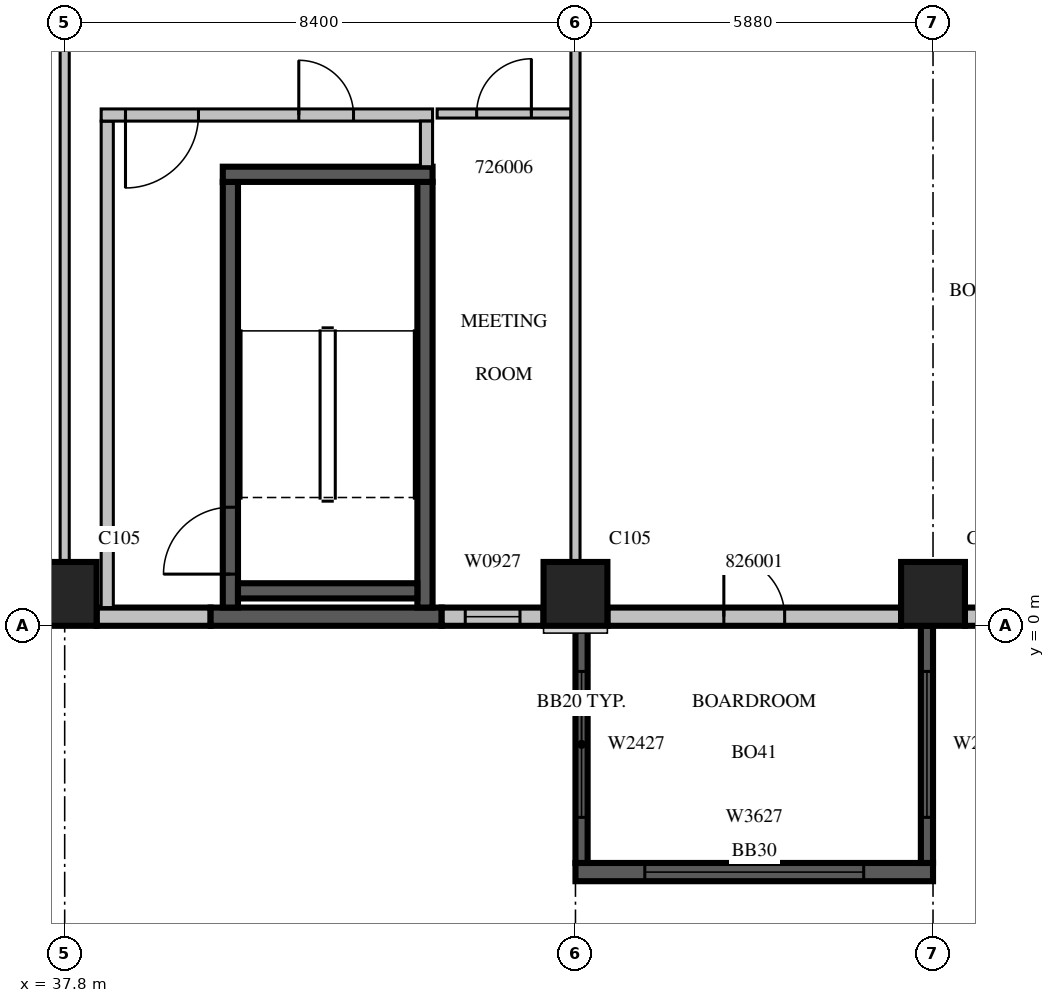
"""IFC4 building model, lengths in metres.
Left out: names, types, materials, properties, quantities, classifications, styles, units other than length and angle.
Written with IfcOpenShell. Run it as: python <this file> out.ifc"""

import sys

from ifc_helpers import new_model, si_unit, direction, frame, frame_2d, origin, origin_2d, place, context, subcontext, project, spatial, rectangle, extrude, source, transform, mapped, element, fill, save


model = new_model("IFC4")
c1 = context("Model", 3, precision=1e-05, world=origin(), true_north=direction((0.0, 1.0)))
c2 = subcontext(c1, "Body", "Model", "MODEL_VIEW")
j1 = project(units=[si_unit("LENGTHUNIT", "METRE"), si_unit("PLANEANGLEUNIT", "RADIAN")], contexts=[c1])
p1 = place(None, origin())
s1 = spatial("IfcSite", under=j1, at=p1, CompositionType="ELEMENT")
p2 = place(p1, origin())
s2 = spatial("IfcBuilding", under=s1, at=p2, CompositionType="ELEMENT")
p3 = place(p2, frame((0.0, 0.0, 120.3)))
s3 = spatial("IfcBuildingStorey", under=s2, at=p3, CompositionType="ELEMENT", Elevation=120.3)
m1 = source(origin(), c2, "Body", "SweptSolid", [
    extrude(rectangle(XDim=1.05, YDim=1.05, at=origin_2d()), origin(), (0.0, 0.0, 1.0), 4.2),
])
for number, where, z_axis, x_axis in (
    (1, (37.8, 0.525, 0.0), (0.0, 0.0, 1.0), (1.0, 0.0, 0.0)),
    (2, (46.2, 0.525, 0.0), (0.0, 0.0, 1.0), (1.0, 0.0, 0.0)),
    (3, (52.08, 0.525, 0.0), (0.0, 0.0, 1.0), (1.0, 0.0, 0.0)),
):
    element("IfcColumn", number, at=place(p3, frame(where, z_axis=z_axis, x_axis=x_axis)), inside=s3, PredefinedType="COLUMN", context=c2, shape_type="MappedRepresentation", body=[
        mapped(m1, transform((0.0, 0.0, 0.0), scale=1.0)),
    ])
m2 = source(origin(), c2, "Body", "SweptSolid", [
    extrude(rectangle(XDim=1.875, YDim=0.3, at=frame_2d((0.938, 0.0))), origin(), (0.0, 0.0, 1.0), 3.8),
])
p4 = place(p3, frame((38.325, 0.15, 0.0), z_axis=(0.0, 0.0, 1.0), x_axis=(1.0, 0.0, 0.0)))
e4 = element("IfcWall", 4, at=p4, inside=s3, PredefinedType="STANDARD", context=c2, shape_type="MappedRepresentation", body=[
    mapped(m2, transform((0.0, 0.0, 0.0), scale=1.0)),
])
m3 = source(origin(), c2, "Body", "SweptSolid", [
    extrude(rectangle(XDim=3.8, YDim=0.3, at=frame_2d((1.9, 0.0))), origin(), (0.0, 0.0, 1.0), 3.8),
])
p5 = place(p3, frame((40.2, 0.15, 0.0), z_axis=(0.0, 0.0, 1.0), x_axis=(1.0, 0.0, 0.0)))
e5 = element("IfcWall", 5, at=p5, inside=s3, PredefinedType="SOLIDWALL", context=c2, shape_type="MappedRepresentation", body=[
    mapped(m3, transform((0.0, 0.0, 0.0), scale=1.0)),
])
m4 = source(origin(), c2, "Body", "SweptSolid", [
    extrude(rectangle(XDim=1.675, YDim=0.3, at=frame_2d((0.838, 0.0))), origin(), (0.0, 0.0, 1.0), 3.8),
])
p6 = place(p3, frame((44.0, 0.15, 0.0), z_axis=(0.0, 0.0, 1.0), x_axis=(1.0, 0.0, 0.0)))
e6 = element("IfcWall", 6, at=p6, inside=s3, PredefinedType="STANDARD", context=c2, shape_type="MappedRepresentation", body=[
    mapped(m4, transform((0.0, 0.0, 0.0), scale=1.0)),
])
m5 = source(origin(), c2, "Body", "SweptSolid", [
    extrude(rectangle(XDim=0.9, YDim=2.7, at=frame_2d((0.45, 1.35))), frame((0.0, 0.16, 0.0), z_axis=(0.0, -1.0, 0.0), x_axis=(1.0, 0.0, 0.0)), (0.0, 0.0, 1.0), 0.32),
])
p7 = place(p6, frame((0.388, 0.0, 0.6)))
e7 = element("IfcOpeningElement", 7, at=p7, cuts=e6, PredefinedType="OPENING", context=c2, shape_type="MappedRepresentation", body=[
    mapped(m5, transform((0.0, 0.0, 0.0), scale=1.0)),
])
m6 = source(origin(), c2, "Body", "SweptSolid", [
    extrude(rectangle(XDim=4.83, YDim=0.3, at=frame_2d((2.415, 0.0))), origin(), (0.0, 0.0, 1.0), 3.8),
])
p8 = place(p3, frame((46.725, 0.15, 0.0), z_axis=(0.0, 0.0, 1.0), x_axis=(1.0, 0.0, 0.0)))
e8 = element("IfcWall", 8, at=p8, inside=s3, PredefinedType="STANDARD", context=c2, shape_type="MappedRepresentation", body=[
    mapped(m6, transform((0.0, 0.0, 0.0), scale=1.0)),
])
m7 = source(origin(), c2, "Body", "SweptSolid", [
    extrude(rectangle(XDim=1.0, YDim=2.1, at=frame_2d((0.5, 1.05))), frame((0.0, 0.16, 0.0), z_axis=(0.0, -1.0, 0.0), x_axis=(1.0, 0.0, 0.0)), (0.0, 0.0, 1.0), 0.32),
])
p9 = place(p8, frame((1.915, 0.0, 0.0)))
e9 = element("IfcOpeningElement", 9, at=p9, cuts=e8, PredefinedType="OPENING", context=c2, shape_type="MappedRepresentation", body=[
    mapped(m7, transform((0.0, 0.0, 0.0), scale=1.0)),
])
p10 = place(p3, frame((52.605, 0.15, 0.0), z_axis=(0.0, 0.0, 1.0), x_axis=(1.0, 0.0, 0.0)))
e10 = element("IfcWall", 10, at=p10, inside=s3, PredefinedType="STANDARD", context=c2, shape_type="MappedRepresentation", body=[
    mapped(m6, transform((0.0, 0.0, 0.0), scale=1.0)),
])
m8 = source(origin(), c2, "Body", "SweptSolid", [
    extrude(rectangle(XDim=3.6, YDim=2.7, at=frame_2d((1.8, 1.35))), frame((0.0, 0.16, 0.0), z_axis=(0.0, -1.0, 0.0), x_axis=(1.0, 0.0, 0.0)), (0.0, 0.0, 1.0), 0.32),
])
p11 = place(p10, frame((0.615, 0.0, 0.6)))
e11 = element("IfcOpeningElement", 11, at=p11, cuts=e10, PredefinedType="OPENING", context=c2, shape_type="MappedRepresentation", body=[
    mapped(m8, transform((0.0, 0.0, 0.0), scale=1.0)),
])
m9 = source(origin(), c2, "Body", "SweptSolid", [
    extrude(rectangle(XDim=5.88, YDim=0.3, at=frame_2d((2.94, 0.0))), origin(), (0.0, 0.0, 1.0), 3.79),
])
p12 = place(p3, frame((46.2, -4.05, 0.0), z_axis=(0.0, 0.0, 1.0), x_axis=(1.0, 0.0, 0.0)))
e12 = element("IfcWall", 12, at=p12, inside=s3, PredefinedType="SOLIDWALL", context=c2, shape_type="MappedRepresentation", body=[
    mapped(m9, transform((0.0, 0.0, 0.0), scale=1.0)),
])
p13 = place(p12, frame((1.14, 0.0, 0.6)))
e13 = element("IfcOpeningElement", 13, at=p13, cuts=e12, PredefinedType="OPENING", context=c2, shape_type="MappedRepresentation", body=[
    mapped(m8, transform((0.0, 0.0, 0.0), scale=1.0)),
])
m10 = source(origin(), c2, "Body", "SweptSolid", [
    extrude(rectangle(XDim=3.9, YDim=0.2, at=frame_2d((1.95, 0.0))), origin(), (0.0, 0.0, 1.0), 3.79),
])
p14 = place(p3, frame((46.3, 0.0, 0.0), z_axis=(0.0, 0.0, 1.0), x_axis=(0.0, -1.0, 0.0)))
e14 = element("IfcWall", 14, at=p14, inside=s3, PredefinedType="SOLIDWALL", context=c2, shape_type="MappedRepresentation", body=[
    mapped(m10, transform((0.0, 0.0, 0.0), scale=1.0)),
])
m11 = source(origin(), c2, "Body", "SweptSolid", [
    extrude(rectangle(XDim=2.4, YDim=2.7, at=frame_2d((1.2, 1.35))), frame((0.0, 0.11, 0.0), z_axis=(0.0, -1.0, 0.0), x_axis=(1.0, 0.0, 0.0)), (0.0, 0.0, 1.0), 0.22),
])
p15 = place(p14, frame((0.75, 0.0, 0.6)))
e15 = element("IfcOpeningElement", 15, at=p15, cuts=e14, PredefinedType="OPENING", context=c2, shape_type="MappedRepresentation", body=[
    mapped(m11, transform((0.0, 0.0, 0.0), scale=1.0)),
])
p16 = place(p3, frame((51.98, 0.0, 0.0), z_axis=(0.0, 0.0, 1.0), x_axis=(0.0, -1.0, 0.0)))
e16 = element("IfcWall", 16, at=p16, inside=s3, PredefinedType="SOLIDWALL", context=c2, shape_type="MappedRepresentation", body=[
    mapped(m10, transform((0.0, 0.0, 0.0), scale=1.0)),
])
p17 = place(p16, frame((0.75, 0.0, 0.6)))
e17 = element("IfcOpeningElement", 17, at=p17, cuts=e16, PredefinedType="OPENING", context=c2, shape_type="MappedRepresentation", body=[
    mapped(m11, transform((0.0, 0.0, 0.0), scale=1.0)),
])
m12 = source(origin(), c2, "Body", "SweptSolid", [
    extrude(rectangle(XDim=7.0, YDim=0.25, at=frame_2d((3.5, 0.0))), origin(), (0.0, 0.0, 1.0), 3.8),
])
p18 = place(p3, frame((40.525, 0.3, 0.0), z_axis=(0.0, 0.0, 1.0), x_axis=(0.0, 1.0, 0.0)))
e18 = element("IfcWall", 18, at=p18, inside=s3, PredefinedType="SOLIDWALL", context=c2, shape_type="MappedRepresentation", body=[
    mapped(m12, transform((0.0, 0.0, 0.0), scale=1.0)),
])
m13 = source(origin(), c2, "Body", "SweptSolid", [
    extrude(rectangle(XDim=1.1, YDim=2.1, at=frame_2d((0.55, 1.05))), frame((0.0, 0.135, 0.0), z_axis=(0.0, -1.0, 0.0), x_axis=(1.0, 0.0, 0.0)), (0.0, 0.0, 1.0), 0.27),
])
p19 = place(p18, frame((0.55, 0.0, 0.0)))
e19 = element("IfcOpeningElement", 19, at=p19, cuts=e18, PredefinedType="OPENING", context=c2, shape_type="MappedRepresentation", body=[
    mapped(m13, transform((0.0, 0.0, 0.0), scale=1.0)),
])
p20 = place(p3, frame((43.725, 0.3, 0.0), z_axis=(0.0, 0.0, 1.0), x_axis=(0.0, 1.0, 0.0)))
e20 = element("IfcWall", 20, at=p20, inside=s3, PredefinedType="SOLIDWALL", context=c2, shape_type="MappedRepresentation", body=[
    mapped(m12, transform((0.0, 0.0, 0.0), scale=1.0)),
])
m14 = source(origin(), c2, "Body", "SweptSolid", [
    extrude(rectangle(XDim=3.45, YDim=0.25, at=frame_2d((1.725, 0.0))), origin(), (0.0, 0.0, 1.0), 3.8),
])
p21 = place(p3, frame((40.4, 7.425, 0.0), z_axis=(0.0, 0.0, 1.0), x_axis=(1.0, 0.0, 0.0)))
e21 = element("IfcWall", 21, at=p21, inside=s3, PredefinedType="SOLIDWALL", context=c2, shape_type="MappedRepresentation", body=[
    mapped(m14, transform((0.0, 0.0, 0.0), scale=1.0)),
])
m15 = source(origin(), c2, "Body", "SweptSolid", [
    extrude(rectangle(XDim=2.95, YDim=0.25, at=frame_2d((1.475, 0.0))), origin(), (0.0, 0.0, 1.0), 3.8),
])
p22 = place(p3, frame((40.65, 0.575, 0.0), z_axis=(0.0, 0.0, 1.0), x_axis=(1.0, 0.0, 0.0)))
e22 = element("IfcWall", 22, at=p22, inside=s3, PredefinedType="SOLIDWALL", context=c2, shape_type="MappedRepresentation", body=[
    mapped(m15, transform((0.0, 0.0, 0.0), scale=1.0)),
])
m16 = source(origin(), c2, "Body", "SweptSolid", [
    extrude(rectangle(XDim=8.0, YDim=0.2, at=frame_2d((4.0, 0.0))), origin(), (0.0, 0.0, 1.0), 3.8),
])
p23 = place(p3, frame((38.5, 0.3, 0.0), z_axis=(0.0, 0.0, 1.0), x_axis=(0.0, 1.0, 0.0)))
e23 = element("IfcWall", 23, at=p23, inside=s3, PredefinedType="PARTITIONING", context=c2, shape_type="MappedRepresentation", body=[
    mapped(m16, transform((0.0, 0.0, 0.0), scale=1.0)),
])
m17 = source(origin(), c2, "Body", "SweptSolid", [
    extrude(rectangle(XDim=5.45, YDim=0.2, at=frame_2d((2.725, 0.0))), origin(), (0.0, 0.0, 1.0), 3.8),
])
p24 = place(p3, frame((38.4, 8.4, 0.0), z_axis=(0.0, 0.0, 1.0), x_axis=(1.0, 0.0, 0.0)))
e24 = element("IfcWall", 24, at=p24, inside=s3, PredefinedType="PARTITIONING", context=c2, shape_type="MappedRepresentation", body=[
    mapped(m17, transform((0.0, 0.0, 0.0), scale=1.0)),
])
m18 = source(origin(), c2, "Body", "SweptSolid", [
    extrude(rectangle(XDim=1.2, YDim=2.1, at=frame_2d((0.6, 1.05))), frame((0.0, 0.11, 0.0), z_axis=(0.0, -1.0, 0.0), x_axis=(1.0, 0.0, 0.0)), (0.0, 0.0, 1.0), 0.22),
])
p25 = place(p24, frame((0.4, 0.0, 0.0)))
e25 = element("IfcOpeningElement", 25, at=p25, cuts=e24, PredefinedType="OPENING", context=c2, shape_type="MappedRepresentation", body=[
    mapped(m18, transform((0.0, 0.0, 0.0), scale=1.0)),
])
m19 = source(origin(), c2, "Body", "SweptSolid", [
    extrude(rectangle(XDim=0.9, YDim=2.1, at=frame_2d((0.45, 1.05))), frame((0.0, 0.11, 0.0), z_axis=(0.0, -1.0, 0.0), x_axis=(1.0, 0.0, 0.0)), (0.0, 0.0, 1.0), 0.22),
])
p26 = place(p24, frame((3.25, 0.0, 0.0)))
e26 = element("IfcOpeningElement", 26, at=p26, cuts=e24, PredefinedType="OPENING", context=c2, shape_type="MappedRepresentation", body=[
    mapped(m19, transform((0.0, 0.0, 0.0), scale=1.0)),
])
m20 = source(origin(), c2, "Body", "SweptSolid", [
    extrude(rectangle(XDim=0.75, YDim=0.2, at=frame_2d((0.375, 0.0))), origin(), (0.0, 0.0, 1.0), 3.8),
])
p27 = place(p3, frame((43.75, 7.55, 0.0), z_axis=(0.0, 0.0, 1.0), x_axis=(0.0, 1.0, 0.0)))
e27 = element("IfcWall", 27, at=p27, inside=s3, PredefinedType="PARTITIONING", context=c2, shape_type="MappedRepresentation", body=[
    mapped(m20, transform((0.0, 0.0, 0.0), scale=1.0)),
])
m21 = source(origin(), c2, "Body", "SweptSolid", [
    extrude(rectangle(XDim=2.2, YDim=0.15, at=frame_2d((1.1, 0.0))), origin(), (0.0, 0.0, 1.0), 3.8),
])
p28 = place(p3, frame((46.125, 8.425, 0.0), z_axis=(0.0, 0.0, 1.0), x_axis=(-1.0, 0.0, 0.0)))
e28 = element("IfcWall", 28, at=p28, inside=s3, PredefinedType="PARTITIONING", context=c2, shape_type="MappedRepresentation", body=[
    mapped(m21, transform((0.0, 0.0, 0.0), scale=1.0)),
])
m22 = source(origin(), c2, "Body", "SweptSolid", [
    extrude(rectangle(XDim=0.9, YDim=2.1, at=frame_2d((0.45, 1.05))), frame((0.0, 0.085, 0.0), z_axis=(0.0, -1.0, 0.0), x_axis=(1.0, 0.0, 0.0)), (0.0, 0.0, 1.0), 0.17),
])
p29 = place(p28, frame((0.65, 0.0, 0.0)))
e29 = element("IfcOpeningElement", 29, at=p29, cuts=e28, PredefinedType="OPENING", context=c2, shape_type="MappedRepresentation", body=[
    mapped(m22, transform((0.0, 0.0, 0.0), scale=1.0)),
])
m23 = source(origin(), c2, "Body", "SweptSolid", [
    extrude(rectangle(XDim=8.927, YDim=0.15, at=frame_2d((4.463, 0.0))), origin(), (0.0, 0.0, 1.0), 3.8),
])
for number, where, z_axis, x_axis in (
    (30, (37.8, 1.049, 0.0), (0.0, 0.0, 1.0), (0.0, 1.0, 0.0)),
    (31, (46.2, 1.049, 0.0), (0.0, 0.0, 1.0), (0.0, 1.0, 0.0)),
):
    element("IfcWall", number, at=place(p3, frame(where, z_axis=z_axis, x_axis=x_axis)), inside=s3, PredefinedType="PARTITIONING", context=c2, shape_type="MappedRepresentation", body=[
        mapped(m23, transform((0.0, 0.0, 0.0), scale=1.0)),
    ])
m24 = source(origin(), c2, "Body", "SweptSolid", [
    extrude(rectangle(XDim=0.9, YDim=2.7, at=frame_2d((0.45, 1.35))), frame((0.0, 0.03, 0.0), z_axis=(0.0, -1.0, 0.0), x_axis=(1.0, 0.0, 0.0)), (0.0, 0.0, 1.0), 0.06),
])
p30 = place(p7, origin())
e32 = element("IfcWindow", 32, at=p30, inside=s3, PartitioningType="SINGLE_PANEL", PredefinedType="WINDOW", context=c2, shape_type="MappedRepresentation", body=[
    mapped(m24, transform((0.0, 0.0, 0.0), scale=1.0)),
])
fill(e7, e32)
m25 = source(origin(), c2, "Body", "SweptSolid", [
    extrude(rectangle(XDim=3.6, YDim=2.7, at=frame_2d((1.8, 1.35))), frame((0.0, 0.03, 0.0), z_axis=(0.0, -1.0, 0.0), x_axis=(1.0, 0.0, 0.0)), (0.0, 0.0, 1.0), 0.06),
])
p31 = place(p13, origin())
e33 = element("IfcWindow", 33, at=p31, inside=s3, PartitioningType="SINGLE_PANEL", PredefinedType="WINDOW", context=c2, shape_type="MappedRepresentation", body=[
    mapped(m25, transform((0.0, 0.0, 0.0), scale=1.0)),
])
fill(e13, e33)
m26 = source(origin(), c2, "Body", "SweptSolid", [
    extrude(rectangle(XDim=2.4, YDim=2.7, at=frame_2d((1.2, 1.35))), frame((0.0, 0.03, 0.0), z_axis=(0.0, -1.0, 0.0), x_axis=(1.0, 0.0, 0.0)), (0.0, 0.0, 1.0), 0.06),
])
p32 = place(p15, origin())
e34 = element("IfcWindow", 34, at=p32, inside=s3, PartitioningType="SINGLE_PANEL", PredefinedType="WINDOW", context=c2, shape_type="MappedRepresentation", body=[
    mapped(m26, transform((0.0, 0.0, 0.0), scale=1.0)),
])
fill(e15, e34)
p33 = place(p17, origin())
e35 = element("IfcWindow", 35, at=p33, inside=s3, PartitioningType="SINGLE_PANEL", PredefinedType="WINDOW", context=c2, shape_type="MappedRepresentation", body=[
    mapped(m26, transform((0.0, 0.0, 0.0), scale=1.0)),
])
fill(e17, e35)
m27 = source(origin(), c2, "Body", "SweptSolid", [
    extrude(rectangle(XDim=1.1, YDim=2.1, at=frame_2d((0.55, 1.05))), frame((0.0, 0.025, 0.0), z_axis=(0.0, -1.0, 0.0), x_axis=(1.0, 0.0, 0.0)), (0.0, 0.0, 1.0), 0.05),
])
p34 = place(p19, origin())
e36 = element("IfcDoor", 36, at=p34, inside=s3, OperationType="SINGLE_SWING_LEFT", PredefinedType="DOOR", context=c2, shape_type="MappedRepresentation", body=[
    mapped(m27, transform((0.0, 0.0, 0.0), scale=1.0)),
])
fill(e19, e36)
m28 = source(origin(), c2, "Body", "SweptSolid", [
    extrude(rectangle(XDim=1.2, YDim=2.1, at=frame_2d((0.6, 1.05))), frame((0.0, 0.025, 0.0), z_axis=(0.0, -1.0, 0.0), x_axis=(1.0, 0.0, 0.0)), (0.0, 0.0, 1.0), 0.05),
])
p35 = place(p25, origin())
e37 = element("IfcDoor", 37, at=p35, inside=s3, OperationType="SINGLE_SWING_RIGHT", PredefinedType="DOOR", context=c2, shape_type="MappedRepresentation", body=[
    mapped(m28, transform((0.0, 0.0, 0.0), scale=1.0)),
])
fill(e25, e37)
m29 = source(origin(), c2, "Body", "SweptSolid", [
    extrude(rectangle(XDim=0.9, YDim=2.1, at=frame_2d((0.45, 1.05))), frame((0.0, 0.025, 0.0), z_axis=(0.0, -1.0, 0.0), x_axis=(1.0, 0.0, 0.0)), (0.0, 0.0, 1.0), 0.05),
])
p36 = place(p26, origin())
e38 = element("IfcDoor", 38, at=p36, inside=s3, OperationType="SINGLE_SWING_LEFT", PredefinedType="DOOR", context=c2, shape_type="MappedRepresentation", body=[
    mapped(m29, transform((0.0, 0.0, 0.0), scale=1.0)),
])
fill(e26, e38)
p37 = place(p29, origin())
e39 = element("IfcDoor", 39, at=p37, inside=s3, OperationType="SINGLE_SWING_RIGHT", PredefinedType="DOOR", context=c2, shape_type="MappedRepresentation", body=[
    mapped(m29, transform((0.0, 0.0, 0.0), scale=1.0)),
])
fill(e29, e39)
m30 = source(origin(), c2, "Body", "SweptSolid", [
    extrude(rectangle(XDim=1.0, YDim=2.1, at=frame_2d((0.5, 1.05))), frame((0.0, 0.025, 0.0), z_axis=(0.0, -1.0, 0.0), x_axis=(1.0, 0.0, 0.0)), (0.0, 0.0, 1.0), 0.05),
])
p38 = place(p9, origin())
e40 = element("IfcDoor", 40, at=p38, inside=s3, OperationType="SINGLE_SWING_LEFT", PredefinedType="DOOR", context=c2, shape_type="MappedRepresentation", body=[
    mapped(m30, transform((0.0, 0.0, 0.0), scale=1.0)),
])
fill(e9, e40)
save(model, sys.argv[1])
